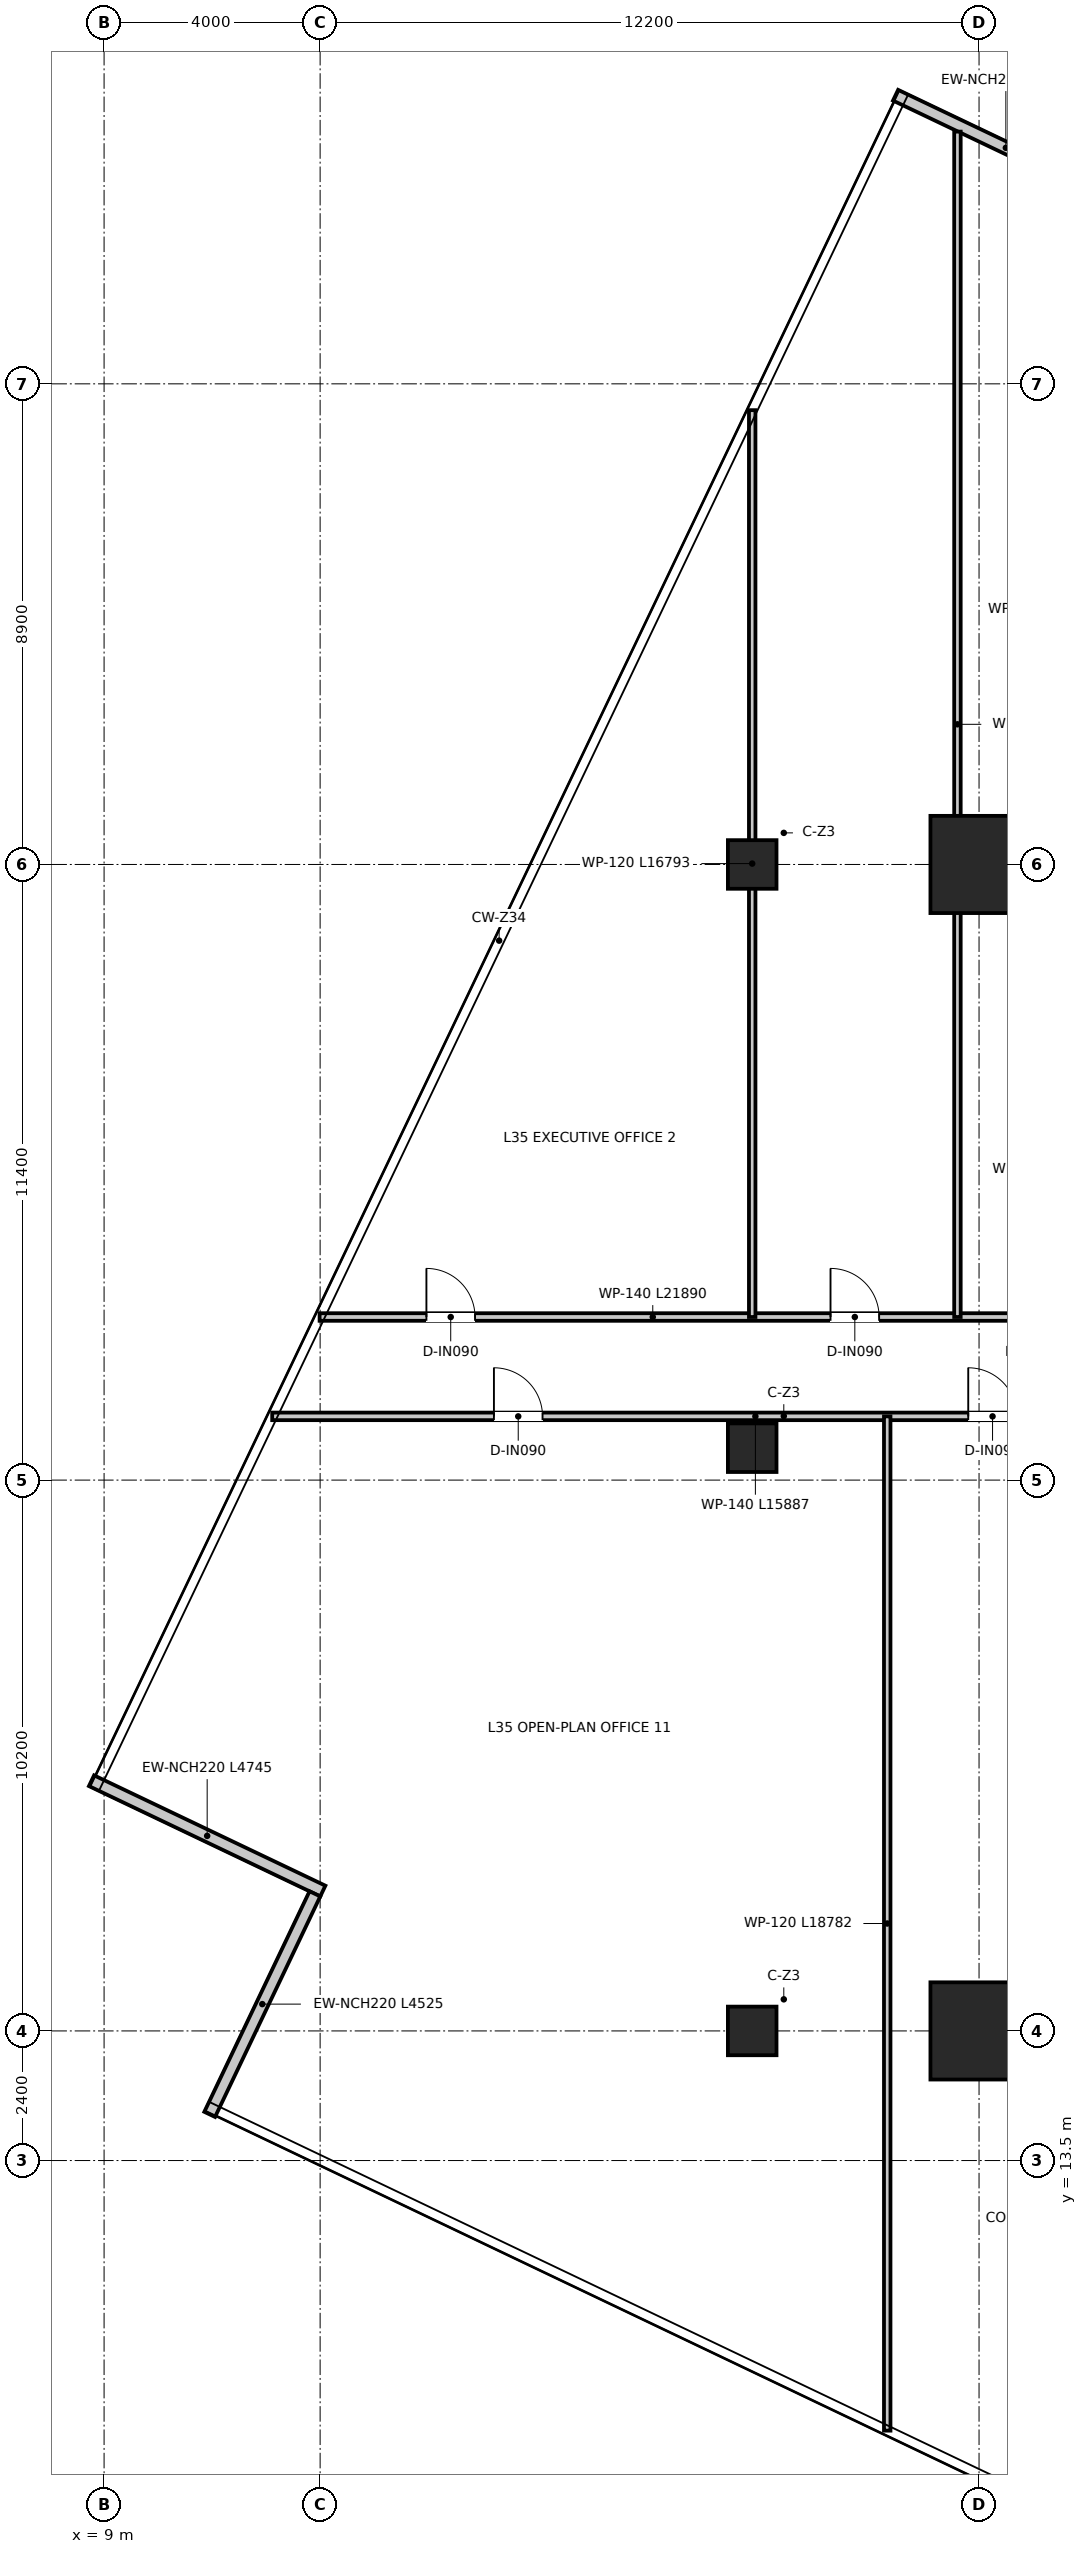
"""IFC4 building model, lengths in metres.
Left out: names, types, materials, properties, quantities, classifications, styles, units other than length and angle.
Written with IfcOpenShell. Run it as: python <this file> out.ifc"""

import sys

from ifc_helpers import new_model, si_unit, direction, frame, frame_2d, origin, origin_2d, place, context, subcontext, project, spatial, rectangle, extrude, source, transform, mapped, element, fill, save


model = new_model("IFC4")
c1 = context("Model", 3, precision=1e-05, world=origin(), true_north=direction((0.0, 1.0)))
c2 = subcontext(c1, "Body", "Model", "MODEL_VIEW")
j1 = project(units=[si_unit("LENGTHUNIT", "METRE"), si_unit("PLANEANGLEUNIT", "RADIAN")], contexts=[c1])
p1 = place(None, origin())
s1 = spatial("IfcSite", under=j1, at=p1, CompositionType="ELEMENT")
p2 = place(p1, origin())
s2 = spatial("IfcBuilding", under=s1, at=p2, CompositionType="ELEMENT")
p3 = place(p2, frame((0.0, 0.0, 146.2)))
s3 = spatial("IfcBuildingStorey", under=s2, at=p3, CompositionType="ELEMENT", Elevation=146.2)
m1 = source(origin(), c2, "Body", "SweptSolid", [
    extrude(rectangle(XDim=1.8, YDim=1.8, at=origin_2d()), origin(), (0.0, 0.0, 1.0), 3.95),
])
for number, where, z_axis, x_axis in (
    (1, (25.2, 15.9, 0.0), (0.0, 0.0, 1.0), (1.0, 0.0, 0.0)),
    (2, (25.2, 37.5, 0.0), (0.0, 0.0, 1.0), (1.0, 0.0, 0.0)),
):
    element("IfcColumn", number, at=place(p3, frame(where, z_axis=z_axis, x_axis=x_axis)), inside=s3, PredefinedType="USERDEFINED", context=c2, shape_type="MappedRepresentation", body=[
        mapped(m1, transform((0.0, 0.0, 0.0), x_axis=(1.0, 0.0, 0.0), y_axis=(0.0, 1.0, 0.0), z_axis=(0.0, 0.0, 1.0), scale=1.0)),
    ])
m2 = source(origin(), c2, "Body", "SweptSolid", [
    extrude(rectangle(XDim=0.9, YDim=0.9, at=origin_2d()), origin(), (0.0, 0.0, 1.0), 3.95),
])
for number, where, z_axis, x_axis in (
    (3, (21.0, 15.9, 0.0), (0.0, 0.0, 1.0), (1.0, 0.0, 0.0)),
    (4, (21.0, 26.7, 0.0), (0.0, 0.0, 1.0), (1.0, 0.0, 0.0)),
    (5, (21.0, 37.5, 0.0), (0.0, 0.0, 1.0), (1.0, 0.0, 0.0)),
):
    element("IfcColumn", number, at=place(p3, frame(where, z_axis=z_axis, x_axis=x_axis)), inside=s3, PredefinedType="COLUMN", context=c2, shape_type="MappedRepresentation", body=[
        mapped(m2, transform((0.0, 0.0, 0.0), x_axis=(1.0, 0.0, 0.0), y_axis=(0.0, 1.0, 0.0), z_axis=(0.0, 0.0, 1.0), scale=1.0)),
    ])
p4 = place(p3, frame((27.739, 49.797, 0.0), z_axis=(0.0, 0.0, 1.0), x_axis=(-0.902592070314, 0.43049686945, 0.0)))
e6 = element("IfcWall", 6, at=p4, inside=s3, PredefinedType="ELEMENTEDWALL", context=c2, shape_type="SweptSolid", body=[
    extrude(rectangle(XDim=4.525, YDim=0.22, at=frame_2d((2.262, 0.0))), origin(), (0.0, 0.0, 1.0), 3.67),
])
p5 = place(p3, frame((8.767, 20.533, 0.0), z_axis=(0.0, 0.0, 1.0), x_axis=(0.902587379521, -0.430506704164, 0.0)))
e7 = element("IfcWall", 7, at=p5, inside=s3, PredefinedType="ELEMENTEDWALL", context=c2, shape_type="SweptSolid", body=[
    extrude(rectangle(XDim=4.745, YDim=0.22, at=frame_2d((2.373, 0.0))), origin(), (0.0, 0.0, 1.0), 3.67),
])
p6 = place(p3, frame((12.903, 18.438, 0.0), z_axis=(0.0, 0.0, 1.0), x_axis=(-0.43049686945, -0.902592070314, 0.0)))
e8 = element("IfcWall", 8, at=p6, inside=s3, PredefinedType="ELEMENTEDWALL", context=c2, shape_type="SweptSolid", body=[
    extrude(rectangle(XDim=4.525, YDim=0.22, at=frame_2d((2.262, 0.0))), origin(), (0.0, 0.0, 1.0), 3.67),
])
p7 = place(p3, frame((12.99, 29.12, 0.0), z_axis=(0.0, 0.0, 1.0), x_axis=(1.0, 0.0, 0.0)))
e9 = element("IfcWall", 9, at=p7, inside=s3, PredefinedType="PARTITIONING", context=c2, shape_type="SweptSolid", body=[
    extrude(rectangle(XDim=21.889, YDim=0.14, at=frame_2d((10.945, 0.0))), origin(), (0.0, 0.0, 1.0), 3.03),
])
p8 = place(p7, frame((17.96, 0.0, 0.0)))
e10 = element("IfcOpeningElement", 10, at=p8, cuts=e9, PredefinedType="OPENING", context=c2, shape_type="SweptSolid", body=[
    extrude(rectangle(XDim=0.9, YDim=2.1, at=frame_2d((0.45, 1.05))), frame((0.0, 0.08, 0.0), z_axis=(0.0, -1.0, 0.0), x_axis=(1.0, 0.0, 0.0)), (0.0, 0.0, 1.0), 0.16),
])
p9 = place(p7, frame((1.978, 0.0, 0.0)))
e11 = element("IfcOpeningElement", 11, at=p9, cuts=e9, PredefinedType="OPENING", context=c2, shape_type="SweptSolid", body=[
    extrude(rectangle(XDim=0.9, YDim=2.1, at=frame_2d((0.45, 1.05))), frame((0.0, 0.08, 0.0), z_axis=(0.0, -1.0, 0.0), x_axis=(1.0, 0.0, 0.0)), (0.0, 0.0, 1.0), 0.16),
])
p10 = place(p7, frame((9.46, 0.0, 0.0)))
e12 = element("IfcOpeningElement", 12, at=p10, cuts=e9, PredefinedType="OPENING", context=c2, shape_type="SweptSolid", body=[
    extrude(rectangle(XDim=0.9, YDim=2.1, at=frame_2d((0.45, 1.05))), frame((0.0, 0.08, 0.0), z_axis=(0.0, -1.0, 0.0), x_axis=(1.0, 0.0, 0.0)), (0.0, 0.0, 1.0), 0.16),
])
p11 = place(p7, frame((12.76, 0.0, 0.0)))
e13 = element("IfcOpeningElement", 13, at=p11, cuts=e9, PredefinedType="OPENING", context=c2, shape_type="SweptSolid", body=[
    extrude(rectangle(XDim=0.9, YDim=2.1, at=frame_2d((0.45, 1.05))), frame((0.0, 0.08, 0.0), z_axis=(0.0, -1.0, 0.0), x_axis=(1.0, 0.0, 0.0)), (0.0, 0.0, 1.0), 0.16),
])
p12 = place(p3, frame((12.113, 27.28, 0.0), z_axis=(0.0, 0.0, 1.0), x_axis=(1.0, 0.0, 0.0)))
e14 = element("IfcWall", 14, at=p12, inside=s3, PredefinedType="PARTITIONING", context=c2, shape_type="SweptSolid", body=[
    extrude(rectangle(XDim=15.887, YDim=0.14, at=frame_2d((7.944, 0.0))), origin(), (0.0, 0.0, 1.0), 3.03),
])
p13 = place(p12, frame((4.105, 0.0, 0.0)))
e15 = element("IfcOpeningElement", 15, at=p13, cuts=e14, PredefinedType="OPENING", context=c2, shape_type="SweptSolid", body=[
    extrude(rectangle(XDim=0.9, YDim=2.1, at=frame_2d((0.45, 1.05))), frame((0.0, 0.08, 0.0), z_axis=(0.0, -1.0, 0.0), x_axis=(1.0, 0.0, 0.0)), (0.0, 0.0, 1.0), 0.16),
])
p14 = place(p12, frame((12.887, 0.0, 0.0)))
e16 = element("IfcOpeningElement", 16, at=p14, cuts=e14, PredefinedType="OPENING", context=c2, shape_type="SweptSolid", body=[
    extrude(rectangle(XDim=0.9, YDim=2.1, at=frame_2d((0.45, 1.05))), frame((0.0, 0.08, 0.0), z_axis=(0.0, -1.0, 0.0), x_axis=(1.0, 0.0, 0.0)), (0.0, 0.0, 1.0), 0.16),
])
p15 = place(p3, frame((21.0, 29.12, 0.0), z_axis=(0.0, 0.0, 1.0), x_axis=(0.0, 1.0, 0.0)))
e17 = element("IfcWall", 17, at=p15, inside=s3, PredefinedType="PARTITIONING", context=c2, shape_type="SweptSolid", body=[
    extrude(rectangle(XDim=16.792, YDim=0.12, at=frame_2d((8.396, 0.0))), origin(), (0.0, 0.0, 1.0), 3.08),
])
p16 = place(p3, frame((24.8, 29.12, 0.0), z_axis=(0.0, 0.0, 1.0), x_axis=(0.0, 1.0, 0.0)))
e18 = element("IfcWall", 18, at=p16, inside=s3, PredefinedType="PARTITIONING", context=c2, shape_type="SweptSolid", body=[
    extrude(rectangle(XDim=21.951, YDim=0.12, at=frame_2d((10.975, 0.0))), origin(), (0.0, 0.0, 1.0), 3.08),
])
p17 = place(p3, frame((23.5, 8.498, 0.0), z_axis=(0.0, 0.0, 1.0), x_axis=(0.0, 1.0, 0.0)))
e19 = element("IfcWall", 19, at=p17, inside=s3, PredefinedType="PARTITIONING", context=c2, shape_type="SweptSolid", body=[
    extrude(rectangle(XDim=18.782, YDim=0.12, at=frame_2d((9.391, 0.0))), origin(), (0.0, 0.0, 1.0), 3.08),
])
p18 = place(p9, origin())
e20 = element("IfcDoor", 20, at=p18, inside=s3, OperationType="SINGLE_SWING_LEFT", PredefinedType="DOOR", context=c2, shape_type="SweptSolid", body=[
    extrude(rectangle(XDim=0.9, YDim=2.1, at=frame_2d((0.45, 1.05))), frame((0.0, 0.025, 0.0), z_axis=(0.0, -1.0, 0.0), x_axis=(1.0, 0.0, 0.0)), (0.0, 0.0, 1.0), 0.05),
])
fill(e11, e20)
p19 = place(p10, origin())
e21 = element("IfcDoor", 21, at=p19, inside=s3, OperationType="SINGLE_SWING_LEFT", PredefinedType="DOOR", context=c2, shape_type="SweptSolid", body=[
    extrude(rectangle(XDim=0.9, YDim=2.1, at=frame_2d((0.45, 1.05))), frame((0.0, 0.025, 0.0), z_axis=(0.0, -1.0, 0.0), x_axis=(1.0, 0.0, 0.0)), (0.0, 0.0, 1.0), 0.05),
])
fill(e12, e21)
p20 = place(p13, origin())
e22 = element("IfcDoor", 22, at=p20, inside=s3, OperationType="SINGLE_SWING_LEFT", PredefinedType="DOOR", context=c2, shape_type="SweptSolid", body=[
    extrude(rectangle(XDim=0.9, YDim=2.1, at=frame_2d((0.45, 1.05))), frame((0.0, 0.025, 0.0), z_axis=(0.0, -1.0, 0.0), x_axis=(1.0, 0.0, 0.0)), (0.0, 0.0, 1.0), 0.05),
])
fill(e15, e22)
p21 = place(p14, origin())
e23 = element("IfcDoor", 23, at=p21, inside=s3, OperationType="SINGLE_SWING_LEFT", PredefinedType="DOOR", context=c2, shape_type="SweptSolid", body=[
    extrude(rectangle(XDim=0.9, YDim=2.1, at=frame_2d((0.45, 1.05))), frame((0.0, 0.025, 0.0), z_axis=(0.0, -1.0, 0.0), x_axis=(1.0, 0.0, 0.0)), (0.0, 0.0, 1.0), 0.05),
])
fill(e16, e23)
save(model, sys.argv[1])
